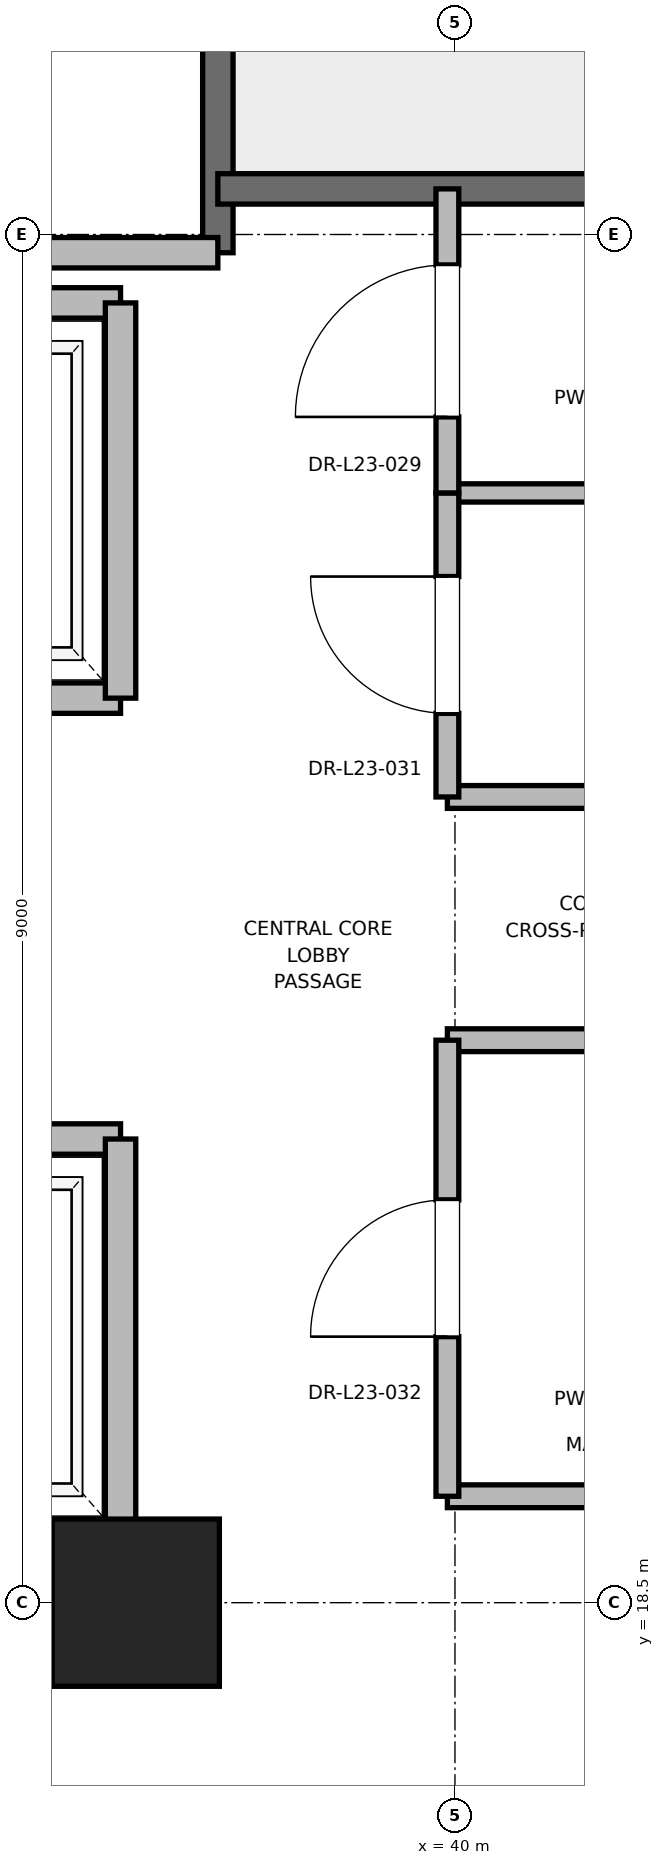
"""IFC4 building model, lengths in metres.
Left out: names, types, materials, properties, quantities, classifications, styles, units other than length and angle.
Written with IfcOpenShell. Run it as: python <this file> out.ifc"""

import sys

from ifc_helpers import new_model, si_unit, direction, frame, frame_2d, origin, origin_2d, place, context, subcontext, project, spatial, rectangle, extrude, element, fill, save


model = new_model("IFC4")
c1 = context("Model", 3, precision=1e-05, world=origin(), true_north=direction((0.0, 1.0)))
c2 = subcontext(c1, "Body", "Model", "MODEL_VIEW")
j1 = project(units=[si_unit("LENGTHUNIT", "METRE"), si_unit("PLANEANGLEUNIT", "RADIAN")], contexts=[c1])
p1 = place(None, origin())
s1 = spatial("IfcSite", under=j1, at=p1, CompositionType="ELEMENT")
p2 = place(p1, origin())
s2 = spatial("IfcBuilding", under=s1, at=p2, CompositionType="ELEMENT")
p3 = place(p2, frame((0.0, 0.0, 99.6)))
s3 = spatial("IfcBuildingStorey", under=s2, at=p3, CompositionType="ELEMENT", Elevation=99.6)
p4 = place(p3, frame((37.9, 18.5, 0.0), z_axis=(0.0, 0.0, 1.0), x_axis=(1.0, 0.0, 0.0)))
e1 = element("IfcColumn", 1, at=p4, inside=s3, PredefinedType="PILASTER", context=c2, shape_type="SweptSolid", body=[
    extrude(rectangle(XDim=1.1, YDim=1.1, at=origin_2d()), origin(), (0.0, 0.0, 1.0), 4.0),
])
p5 = place(p3, frame((29.0, 18.5, 0.0), z_axis=(0.0, 0.0, 1.0), x_axis=(1.0, 0.0, 0.0)))
e2 = element("IfcWall", 2, at=p5, inside=s3, PredefinedType="SHEAR", context=c2, shape_type="SweptSolid", body=[
    extrude(rectangle(XDim=9.2, YDim=0.65, at=frame_2d((4.6, 0.0))), origin(), (0.0, 0.0, 1.0), 3.76),
])
p6 = place(p3, frame((38.44, 27.38, 0.0), z_axis=(0.0, 0.0, 1.0), x_axis=(0.0, 1.0, 0.0)))
e3 = element("IfcWall", 3, at=p6, inside=s3, PredefinedType="SOLIDWALL", context=c2, shape_type="SweptSolid", body=[
    extrude(rectangle(XDim=8.87, YDim=0.2, at=frame_2d((4.435, 0.0))), origin(), (0.0, 0.0, 1.0), 3.76),
])
p7 = place(p3, frame((38.44, 27.8, 0.0), z_axis=(0.0, 0.0, 1.0), x_axis=(1.0, 0.0, 0.0)))
e4 = element("IfcWall", 4, at=p7, inside=s3, PredefinedType="SOLIDWALL", context=c2, shape_type="SweptSolid", body=[
    extrude(rectangle(XDim=3.32, YDim=0.2, at=frame_2d((1.66, 0.0))), origin(), (0.0, 0.0, 1.0), 3.76),
])
p8 = place(p3, frame((32.82, 27.38, 0.0), z_axis=(0.0, 0.0, 1.0), x_axis=(1.0, 0.0, 0.0)))
e5 = element("IfcWall", 5, at=p8, inside=s3, PredefinedType="PARTITIONING", context=c2, shape_type="SweptSolid", body=[
    extrude(rectangle(XDim=5.62, YDim=0.2, at=frame_2d((2.81, 0.0))), origin(), (0.0, 0.0, 1.0), 3.76),
])
p9 = place(p3, frame((35.5, 18.95, 0.0), z_axis=(0.0, 0.0, 1.0), x_axis=(1.0, 0.0, 0.0)))
e6 = element("IfcWall", 6, at=p9, inside=s3, PredefinedType="SOLIDWALL", context=c2, shape_type="SweptSolid", body=[
    extrude(rectangle(XDim=2.3, YDim=0.2, at=frame_2d((1.15, 0.0))), origin(), (0.0, 0.0, 1.0), 2.54),
])
p10 = place(p3, frame((37.8, 21.55, 0.0), z_axis=(0.0, 0.0, 1.0), x_axis=(-1.0, 0.0, 0.0)))
e7 = element("IfcWall", 7, at=p10, inside=s3, PredefinedType="SOLIDWALL", context=c2, shape_type="SweptSolid", body=[
    extrude(rectangle(XDim=2.3, YDim=0.2, at=frame_2d((1.15, 0.0))), origin(), (0.0, 0.0, 1.0), 3.76),
])
p11 = place(p10, frame((0.6, 0.0, 0.0)))
e8 = element("IfcOpeningElement", 8, at=p11, cuts=e7, PredefinedType="OPENING", context=c2, shape_type="SweptSolid", body=[
    extrude(rectangle(XDim=1.1, YDim=2.2, at=frame_2d((0.55, 1.1))), frame((0.0, 0.1, 0.0), z_axis=(0.0, -1.0, 0.0), x_axis=(1.0, 0.0, 0.0)), (0.0, 0.0, 1.0), 0.2),
])
p12 = place(p3, frame((37.8, 18.95, 0.0), z_axis=(0.0, 0.0, 1.0), x_axis=(0.0, 1.0, 0.0)))
e9 = element("IfcWall", 9, at=p12, inside=s3, PredefinedType="SOLIDWALL", context=c2, shape_type="SweptSolid", body=[
    extrude(rectangle(XDim=2.6, YDim=0.2, at=frame_2d((1.3, 0.0))), origin(), (0.0, 0.0, 1.0), 2.54),
])
p13 = place(p3, frame((35.5, 24.45, 0.0), z_axis=(0.0, 0.0, 1.0), x_axis=(1.0, 0.0, 0.0)))
e10 = element("IfcWall", 10, at=p13, inside=s3, PredefinedType="SOLIDWALL", context=c2, shape_type="SweptSolid", body=[
    extrude(rectangle(XDim=2.3, YDim=0.2, at=frame_2d((1.15, 0.0))), origin(), (0.0, 0.0, 1.0), 3.76),
])
p14 = place(p13, frame((0.6, 0.0, 0.0)))
e11 = element("IfcOpeningElement", 11, at=p14, cuts=e10, PredefinedType="OPENING", context=c2, shape_type="SweptSolid", body=[
    extrude(rectangle(XDim=1.1, YDim=2.2, at=frame_2d((0.55, 1.1))), frame((0.0, 0.1, 0.0), z_axis=(0.0, -1.0, 0.0), x_axis=(1.0, 0.0, 0.0)), (0.0, 0.0, 1.0), 0.2),
])
p15 = place(p3, frame((37.8, 27.05, 0.0), z_axis=(0.0, 0.0, 1.0), x_axis=(-1.0, 0.0, 0.0)))
e12 = element("IfcWall", 12, at=p15, inside=s3, PredefinedType="SOLIDWALL", context=c2, shape_type="SweptSolid", body=[
    extrude(rectangle(XDim=2.3, YDim=0.2, at=frame_2d((1.15, 0.0))), origin(), (0.0, 0.0, 1.0), 3.76),
])
p16 = place(p3, frame((37.8, 24.45, 0.0), z_axis=(0.0, 0.0, 1.0), x_axis=(0.0, 1.0, 0.0)))
e13 = element("IfcWall", 13, at=p16, inside=s3, PredefinedType="SOLIDWALL", context=c2, shape_type="SweptSolid", body=[
    extrude(rectangle(XDim=2.6, YDim=0.2, at=frame_2d((1.3, 0.0))), origin(), (0.0, 0.0, 1.0), 3.76),
])
for number, where, z_axis, x_axis in (
    (14, (39.95, 19.2, 0.0), (0.0, 0.0, 1.0), (1.0, 0.0, 0.0)),
    (15, (39.95, 22.2, 0.0), (0.0, 0.0, 1.0), (1.0, 0.0, 0.0)),
    (16, (39.95, 23.8, 0.0), (0.0, 0.0, 1.0), (1.0, 0.0, 0.0)),
):
    element("IfcWall", number, at=place(p3, frame(where, z_axis=z_axis, x_axis=x_axis)), inside=s3, PredefinedType="PARTITIONING", context=c2, shape_type="SweptSolid", body=[
        extrude(rectangle(XDim=1.81, YDim=0.15, at=frame_2d((0.905, 0.0))), origin(), (0.0, 0.0, 1.0), 2.85),
    ])
p17 = place(p3, frame((39.95, 25.8, 0.0), z_axis=(0.0, 0.0, 1.0), x_axis=(1.0, 0.0, 0.0)))
e17 = element("IfcWall", 17, at=p17, inside=s3, PredefinedType="PARTITIONING", context=c2, shape_type="SweptSolid", body=[
    extrude(rectangle(XDim=1.81, YDim=0.12, at=frame_2d((0.905, 0.0))), origin(), (0.0, 0.0, 1.0), 2.85),
])
p18 = place(p3, frame((39.95, 19.2, 0.0), z_axis=(0.0, 0.0, 1.0), x_axis=(0.0, 1.0, 0.0)))
e18 = element("IfcWall", 18, at=p18, inside=s3, PredefinedType="PARTITIONING", context=c2, shape_type="SweptSolid", body=[
    extrude(rectangle(XDim=3.0, YDim=0.15, at=frame_2d((1.5, 0.0))), origin(), (0.0, 0.0, 1.0), 2.85),
])
p19 = place(p18, frame((1.05, 0.0, 0.0)))
e19 = element("IfcOpeningElement", 19, at=p19, cuts=e18, PredefinedType="OPENING", context=c2, shape_type="SweptSolid", body=[
    extrude(rectangle(XDim=0.9, YDim=2.1, at=frame_2d((0.45, 1.05))), frame((0.0, 0.075, 0.0), z_axis=(0.0, -1.0, 0.0), x_axis=(1.0, 0.0, 0.0)), (0.0, 0.0, 1.0), 0.15),
])
p20 = place(p3, frame((39.95, 23.8, 0.0), z_axis=(0.0, 0.0, 1.0), x_axis=(0.0, 1.0, 0.0)))
e20 = element("IfcWall", 20, at=p20, inside=s3, PredefinedType="PARTITIONING", context=c2, shape_type="SweptSolid", body=[
    extrude(rectangle(XDim=2.0, YDim=0.15, at=frame_2d((1.0, 0.0))), origin(), (0.0, 0.0, 1.0), 2.85),
])
p21 = place(p20, frame((0.55, 0.0, 0.0)))
e21 = element("IfcOpeningElement", 21, at=p21, cuts=e20, PredefinedType="OPENING", context=c2, shape_type="SweptSolid", body=[
    extrude(rectangle(XDim=0.9, YDim=2.1, at=frame_2d((0.45, 1.05))), frame((0.0, 0.075, 0.0), z_axis=(0.0, -1.0, 0.0), x_axis=(1.0, 0.0, 0.0)), (0.0, 0.0, 1.0), 0.15),
])
p22 = place(p3, frame((39.95, 25.8, 0.0), z_axis=(0.0, 0.0, 1.0), x_axis=(0.0, 1.0, 0.0)))
e22 = element("IfcWall", 22, at=p22, inside=s3, PredefinedType="PARTITIONING", context=c2, shape_type="SweptSolid", body=[
    extrude(rectangle(XDim=2.0, YDim=0.15, at=frame_2d((1.0, 0.0))), origin(), (0.0, 0.0, 1.0), 2.85),
])
p23 = place(p22, frame((0.5, 0.0, 0.0)))
e23 = element("IfcOpeningElement", 23, at=p23, cuts=e22, PredefinedType="OPENING", context=c2, shape_type="SweptSolid", body=[
    extrude(rectangle(XDim=1.0, YDim=2.15, at=frame_2d((0.5, 1.075))), frame((0.0, 0.075, 0.0), z_axis=(0.0, -1.0, 0.0), x_axis=(1.0, 0.0, 0.0)), (0.0, 0.0, 1.0), 0.15),
])
p24 = place(p19, origin())
e24 = element("IfcDoor", 24, at=p24, inside=s3, OperationType="SINGLE_SWING_LEFT", PredefinedType="DOOR", context=c2, shape_type="SweptSolid", body=[
    extrude(rectangle(XDim=0.9, YDim=2.1, at=frame_2d((0.45, 1.05))), frame((0.0, 0.025, 0.0), z_axis=(0.0, -1.0, 0.0), x_axis=(1.0, 0.0, 0.0)), (0.0, 0.0, 1.0), 0.05),
])
fill(e19, e24)
p25 = place(p21, origin())
e25 = element("IfcDoor", 25, at=p25, inside=s3, OperationType="SINGLE_SWING_RIGHT", PredefinedType="DOOR", context=c2, shape_type="SweptSolid", body=[
    extrude(rectangle(XDim=0.9, YDim=2.1, at=frame_2d((0.45, 1.05))), frame((0.0, 0.025, 0.0), z_axis=(0.0, -1.0, 0.0), x_axis=(1.0, 0.0, 0.0)), (0.0, 0.0, 1.0), 0.05),
])
fill(e21, e25)
p26 = place(p23, origin())
e26 = element("IfcDoor", 26, at=p26, inside=s3, OperationType="SINGLE_SWING_LEFT", PredefinedType="DOOR", context=c2, shape_type="SweptSolid", body=[
    extrude(rectangle(XDim=1.0, YDim=2.15, at=frame_2d((0.5, 1.075))), frame((0.0, 0.025, 0.0), z_axis=(0.0, -1.0, 0.0), x_axis=(1.0, 0.0, 0.0)), (0.0, 0.0, 1.0), 0.05),
])
fill(e23, e26)
save(model, sys.argv[1])
